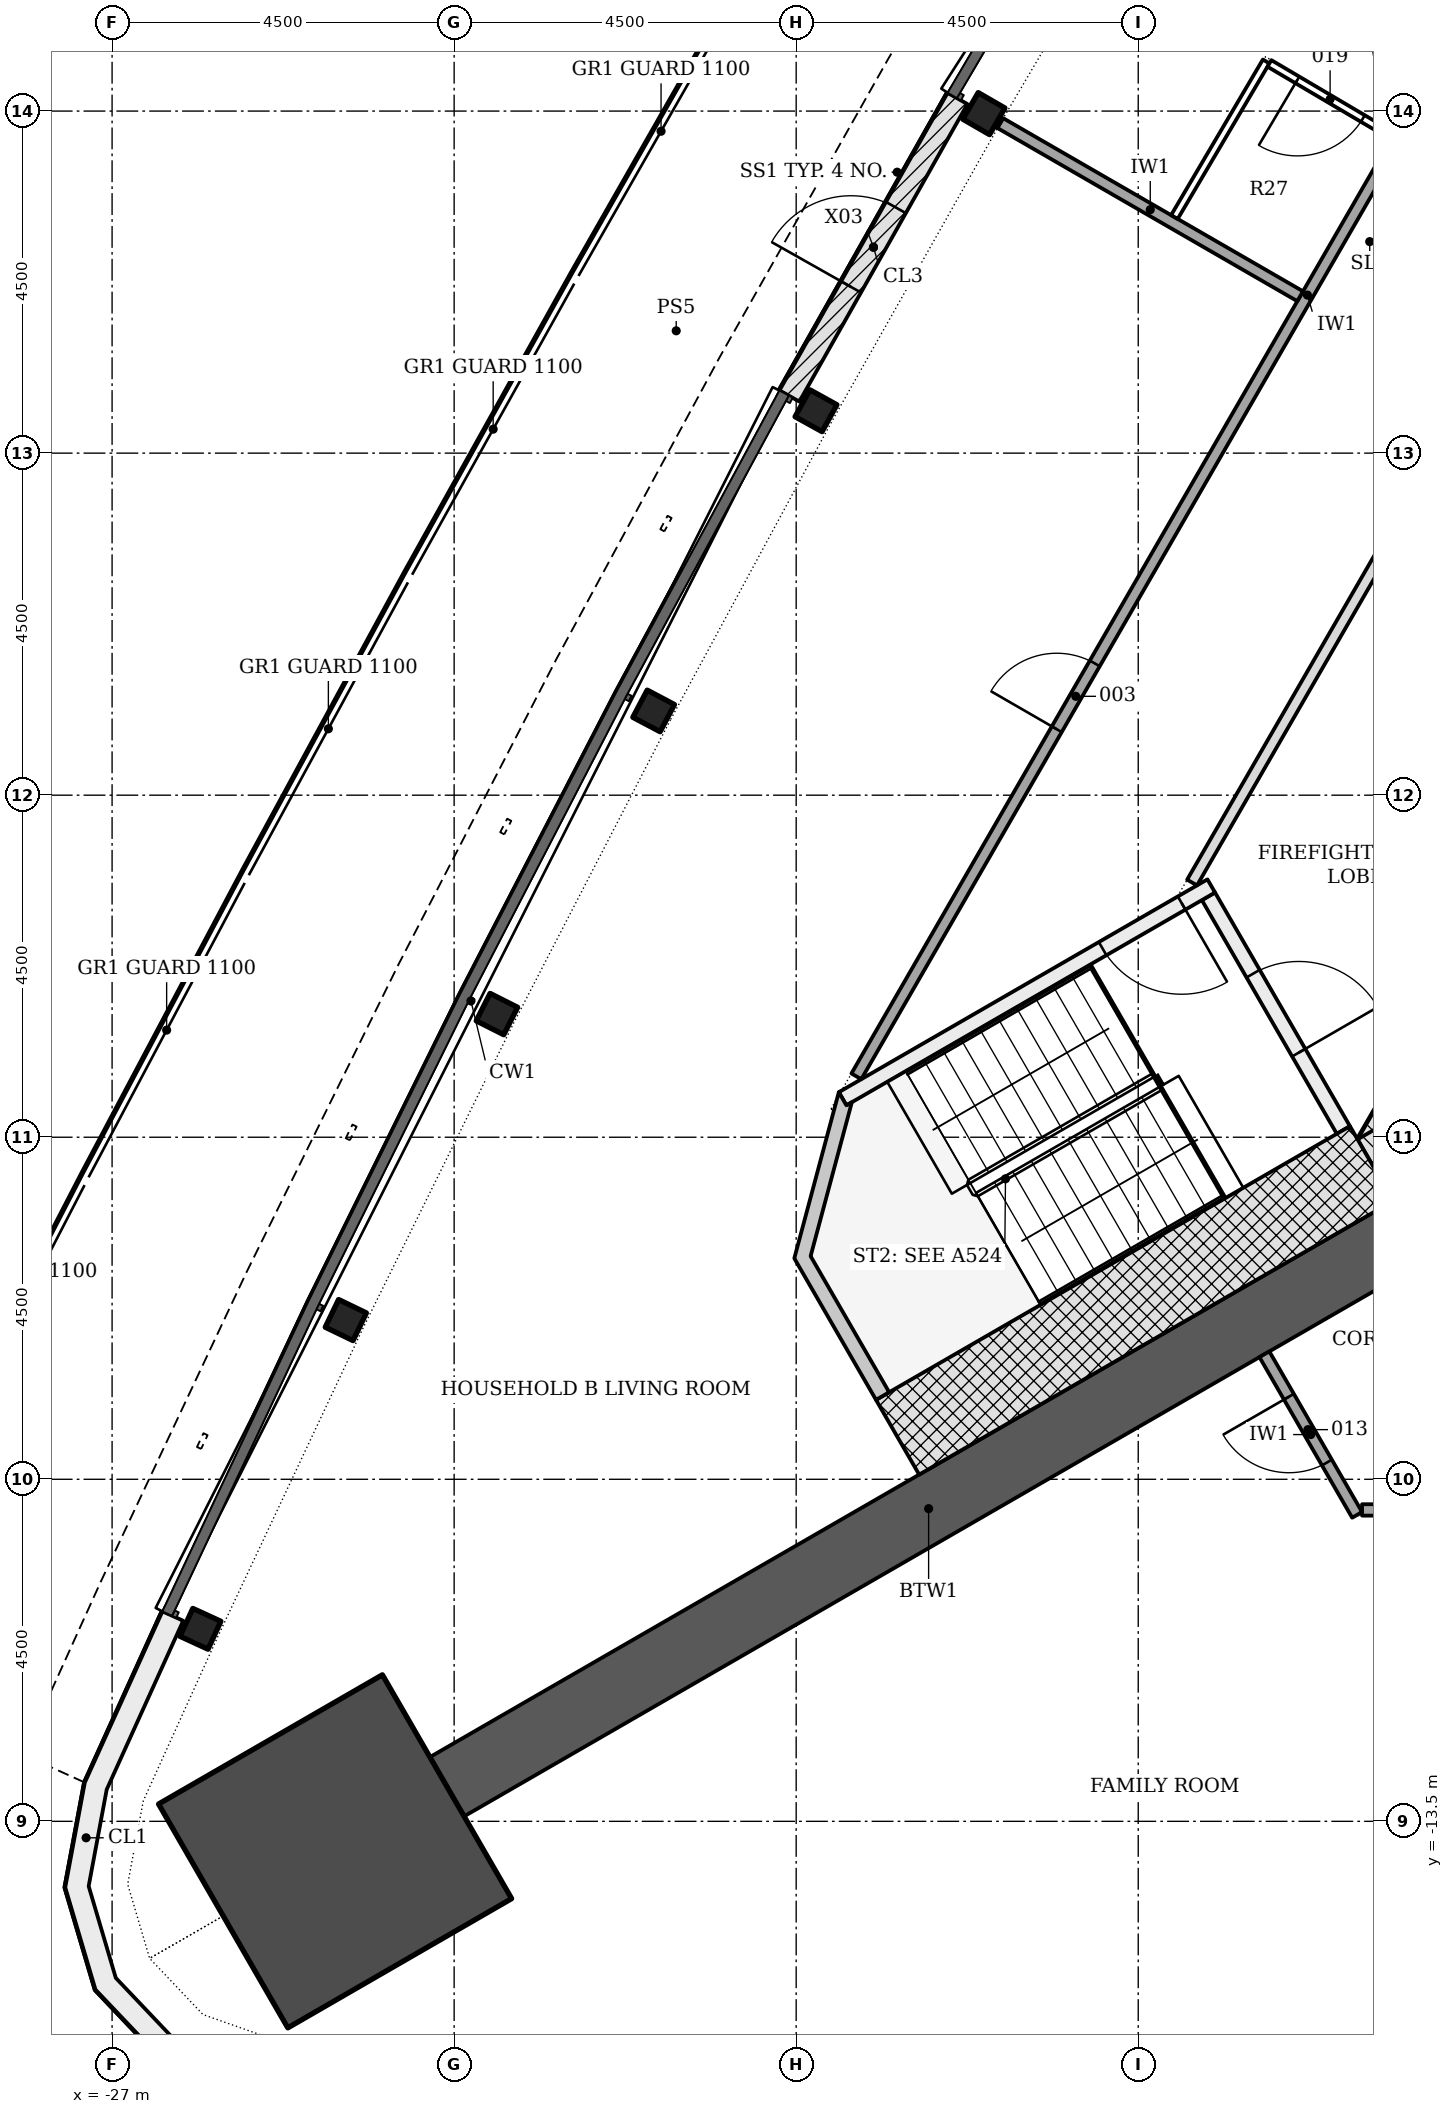
"""IFC4 building model, lengths in metres.
Left out: names, types, materials, properties, quantities, classifications, styles, units other than length and angle.
Written with IfcOpenShell. Run it as: python <this file> out.ifc"""

import sys

from ifc_helpers import new_model, si_unit, direction, frame, frame_2d, origin, origin_2d, place, context, subcontext, project, spatial, polyline, rectangle, i_section, outline, extrude, element, fill, save


model = new_model("IFC4")
c1 = context("Model", 3, precision=1e-05, world=origin(), true_north=direction((0.0, 1.0)))
c2 = subcontext(c1, "Body", "Model", "MODEL_VIEW")
j1 = project(units=[si_unit("LENGTHUNIT", "METRE"), si_unit("PLANEANGLEUNIT", "RADIAN")], contexts=[c1])
p1 = place(None, origin())
s1 = spatial("IfcSite", under=j1, at=p1, CompositionType="ELEMENT")
p2 = place(p1, origin())
s2 = spatial("IfcBuilding", under=s1, at=p2, CompositionType="ELEMENT")
p3 = place(p2, frame((0.0, 0.0, 24.0)))
s3 = spatial("IfcBuildingStorey", under=s2, at=p3, CompositionType="ELEMENT", Elevation=24.0)
p4 = place(p3, frame((-1.083, 11.281, -0.2), z_axis=(0.0, 0.0, 1.0), x_axis=(-0.500001446645, -0.866024568562, 0.0)))
e1 = element("IfcWall", 1, at=p4, inside=s3, PredefinedType="SHEAR", context=c2, shape_type="SweptSolid", body=[
    extrude(rectangle(XDim=18.458, YDim=0.7, at=frame_2d((9.229, 0.0))), origin(), (0.0, 0.0, 1.0), 3.6),
])
p5 = place(p4, frame((8.979, 0.0, 0.2)))
e2 = element("IfcOpeningElement", 2, at=p5, cuts=e1, PredefinedType="OPENING", context=c2, shape_type="SweptSolid", body=[
    extrude(rectangle(XDim=1.2, YDim=2.1, at=frame_2d((0.6, 1.05))), frame((0.0, 0.36, 0.0), z_axis=(0.0, -1.0, 0.0), x_axis=(1.0, 0.0, 0.0)), (0.0, 0.0, 1.0), 0.72),
])
p6 = place(p4, frame((11.029, 0.0, 0.2)))
e3 = element("IfcOpeningElement", 3, at=p6, cuts=e1, PredefinedType="OPENING", context=c2, shape_type="SweptSolid", body=[
    extrude(rectangle(XDim=1.2, YDim=2.1, at=frame_2d((0.6, 1.05))), frame((0.0, 0.36, 0.0), z_axis=(0.0, -1.0, 0.0), x_axis=(1.0, 0.0, 0.0)), (0.0, 0.0, 1.0), 0.72),
])
p7 = place(p3, frame((-10.311, -4.353, -0.2), z_axis=(0.0, 0.0, 1.0), x_axis=(0.500042739161, -0.866000726912, 0.0)))
e4 = element("IfcWall", 4, at=p7, inside=s3, PredefinedType="SHEAR", context=c2, shape_type="SweptSolid", body=[
    extrude(rectangle(XDim=2.771, YDim=0.7, at=frame_2d((1.386, 0.0))), origin(), (0.0, 0.0, 1.0), 3.6),
])
p8 = place(p3, frame((-9.922, -5.728, -0.2), z_axis=(0.0, 0.0, 1.0), x_axis=(-0.866028046028, -0.499995423472, 0.0)))
e5 = element("IfcWall", 5, at=p8, inside=s3, PredefinedType="SHEAR", context=c2, shape_type="SweptSolid", body=[
    extrude(rectangle(XDim=14.633, YDim=0.9, at=frame_2d((7.316, 0.0))), origin(), (0.0, 0.0, 1.0), 3.6),
])
p9 = place(p3, frame((-24.066, -13.895, -0.2), z_axis=(0.0, 0.0, 1.0), x_axis=(-0.866025403784, -0.5, 0.0)))
e6 = element("IfcColumn", 6, at=p9, inside=s3, PredefinedType="COLUMN", context=c2, shape_type="SweptSolid", body=[
    extrude(rectangle(XDim=3.4, YDim=3.4, at=origin_2d()), origin(), (0.0, 0.0, 1.0), 3.6),
])
for number, where, z_axis, x_axis in (
    (7, (-15.531, 8.967, -0.2), (0.0, 0.0, 1.0), (-0.5, -0.866, 0.0)),
    (8, (-17.739, 5.058, -0.2), (0.0, 0.0, 1.0), (-0.484, -0.875, 0.0)),
    (9, (-19.875, 1.108, -0.2), (0.0, 0.0, 1.0), (-0.468, -0.884, 0.0)),
    (10, (-21.937, -2.88, -0.2), (0.0, 0.0, 1.0), (-0.451, -0.893, 0.0)),
    (11, (-23.925, -6.905, -0.2), (0.0, 0.0, 1.0), (-0.434, -0.901, 0.0)),
    (12, (-25.838, -10.967, -0.2), (0.0, 0.0, 1.0), (-0.418, -0.909, 0.0)),
):
    element("IfcColumn", number, at=place(p3, frame(where, z_axis=z_axis, x_axis=x_axis)), inside=s3, PredefinedType="COLUMN", context=c2, shape_type="SweptSolid", body=[
        extrude(i_section(OverallWidth=0.404, OverallDepth=0.406, WebThickness=0.027, FlangeThickness=0.044, FilletRadius=0.015, at=origin_2d()), origin(), (0.0, 0.0, 1.0), 3.6),
    ])
p10 = place(p3, frame((-18.089, 5.252, 0.0), z_axis=(0.0, 0.0, 1.0), x_axis=(0.491969578613, 0.870612390056, 0.0)))
e13 = element("IfcWall", 13, at=p10, inside=s3, PredefinedType="NOTDEFINED", context=c2, shape_type="SweptSolid", body=[
    extrude(rectangle(XDim=4.496, YDim=0.3, at=frame_2d((2.248, 0.0))), origin(), (0.0, 0.0, 1.0), 3.3),
])
p11 = place(p10, frame((1.648, 0.0, 0.0)))
e14 = element("IfcOpeningElement", 14, at=p11, cuts=e13, PredefinedType="OPENING", context=c2, shape_type="SweptSolid", body=[
    extrude(rectangle(XDim=1.2, YDim=2.4, at=frame_2d((0.6, 1.2))), frame((0.0, 0.16, 0.0), z_axis=(0.0, -1.0, 0.0), x_axis=(1.0, 0.0, 0.0)), (0.0, 0.0, 1.0), 0.32),
])
p12 = place(p3, origin())
e15 = element("IfcWall", 15, at=p12, inside=s3, PredefinedType="NOTDEFINED", context=c2, shape_type="SweptSolid", body=[
    extrude(outline(polyline([(-26.338, -10.738), (-27.359, -12.99), (-27.616, -14.369), (-27.218, -15.715), (-26.252, -16.732), (-24.929, -17.199), (-22.468, -17.44), (-22.438, -17.142), (-24.863, -16.904), (-26.084, -16.473), (-26.951, -15.56), (-27.308, -14.353), (-27.071, -13.08), (-26.064, -10.861), (-26.338, -10.738)])), origin(), (0.0, 0.0, 1.0), 3.3),
])
p13 = place(p3, frame((-12.576, -1.331, -0.2), z_axis=(0.0, 0.0, 1.0), x_axis=(0.499970499736, -0.8660424351, 0.0)))
e16 = element("IfcWall", 16, at=p13, inside=s3, PredefinedType="SHEAR", context=c2, shape_type="SweptSolid", body=[
    extrude(rectangle(XDim=3.55, YDim=0.2, at=frame_2d((1.775, 0.0))), origin(), (0.0, 0.0, 1.0), 3.6),
])
p14 = place(p13, frame((1.175, 0.0, 0.2)))
e17 = element("IfcOpeningElement", 17, at=p14, cuts=e16, PredefinedType="OPENING", context=c2, shape_type="SweptSolid", body=[
    extrude(rectangle(XDim=1.2, YDim=2.1, at=frame_2d((0.6, 1.05))), frame((0.0, 0.11, 0.0), z_axis=(0.0, -1.0, 0.0), x_axis=(1.0, 0.0, 0.0)), (0.0, 0.0, 1.0), 0.22),
])
p15 = place(p3, frame((-12.539, -1.194, -0.2), z_axis=(0.0, 0.0, 1.0), x_axis=(-0.866045472092, -0.499965239061, 0.0)))
e18 = element("IfcWall", 18, at=p15, inside=s3, PredefinedType="SHEAR", context=c2, shape_type="SweptSolid", body=[
    extrude(rectangle(XDim=5.6, YDim=0.2, at=frame_2d((2.8, 0.0))), origin(), (0.0, 0.0, 1.0), 3.6),
])
p16 = place(p15, frame((0.45, 0.0, 0.2)))
e19 = element("IfcOpeningElement", 19, at=p16, cuts=e18, PredefinedType="OPENING", context=c2, shape_type="SweptSolid", body=[
    extrude(rectangle(XDim=1.2, YDim=2.1, at=frame_2d((0.6, 1.05))), frame((0.0, 0.11, 0.0), z_axis=(0.0, -1.0, 0.0), x_axis=(1.0, 0.0, 0.0)), (0.0, 0.0, 1.0), 0.22),
])
p17 = place(p3, frame((-10.43, -4.847, -0.2), z_axis=(0.0, 0.0, 1.0), x_axis=(-0.866018442252, -0.500012057535, 0.0)))
e20 = element("IfcWall", 20, at=p17, inside=s3, PredefinedType="SHEAR", context=c2, shape_type="SweptSolid", body=[
    extrude(rectangle(XDim=7.2, YDim=1.136, at=frame_2d((3.6, 0.0))), origin(), (0.0, 0.0, 1.0), 3.6),
])
p18 = place(p3, frame((0.0, 0.0, -0.2)))
e21 = element("IfcWall", 21, at=p18, inside=s3, PredefinedType="SHEAR", context=c2, shape_type="SweptSolid", body=[
    extrude(outline(polyline([(-17.439, -3.907), (-18.025, -6.093), (-16.95, -7.955), (-16.777, -7.855), (-17.81, -6.065), (-17.267, -4.039), (-17.339, -4.081), (-17.339, -4.081), (-17.339, -4.081), (-17.339, -4.081), (-17.339, -4.081), (-17.339, -4.081), (-17.339, -4.081), (-17.339, -4.081), (-17.339, -4.081), (-17.339, -4.081), (-17.339, -4.081), (-17.339, -4.081), (-17.339, -4.081), (-17.339, -4.081), (-17.339, -4.081), (-17.339, -4.081), (-17.339, -4.081), (-17.439, -3.907)])), origin(), (0.0, 0.0, 1.0), 3.6),
])
p19 = place(p3, frame((-17.208, -3.699, 0.0), z_axis=(0.0, 0.0, 1.0), x_axis=(0.499997567621, 0.866026808115, 0.0)))
e22 = element("IfcWall", 22, at=p19, inside=s3, PredefinedType="PARTITIONING", context=c2, shape_type="SweptSolid", body=[
    extrude(rectangle(XDim=23.736, YDim=0.15, at=frame_2d((11.868, 0.0))), origin(), (0.0, 0.0, 1.0), 2.768),
])
p20 = place(p19, frame((16.656, 0.0, 0.0)))
e23 = element("IfcOpeningElement", 23, at=p20, cuts=e22, PredefinedType="OPENING", context=c2, shape_type="SweptSolid", body=[
    extrude(rectangle(XDim=1.1, YDim=2.1, at=frame_2d((0.55, 1.05))), frame((0.0, 0.085, 0.0), z_axis=(0.0, -1.0, 0.0), x_axis=(1.0, 0.0, 0.0)), (0.0, 0.0, 1.0), 0.17),
])
p21 = place(p19, frame((14.662, 0.0, 0.0)))
e24 = element("IfcOpeningElement", 24, at=p21, cuts=e22, PredefinedType="OPENING", context=c2, shape_type="SweptSolid", body=[
    extrude(rectangle(XDim=1.1, YDim=2.1, at=frame_2d((0.55, 1.05))), frame((0.0, 0.085, 0.0), z_axis=(0.0, -1.0, 0.0), x_axis=(1.0, 0.0, 0.0)), (0.0, 0.0, 1.0), 0.17),
])
p22 = place(p19, frame((5.273, 0.0, 0.0)))
e25 = element("IfcOpeningElement", 25, at=p22, cuts=e22, PredefinedType="OPENING", context=c2, shape_type="SweptSolid", body=[
    extrude(rectangle(XDim=1.0, YDim=2.1, at=frame_2d((0.5, 1.05))), frame((0.0, 0.085, 0.0), z_axis=(0.0, -1.0, 0.0), x_axis=(1.0, 0.0, 0.0)), (0.0, 0.0, 1.0), 0.17),
])
p23 = place(p3, frame((-4.407, 13.374, 0.0), z_axis=(0.0, 0.0, 1.0), x_axis=(-0.499997181693, -0.866027030928, 0.0)))
e26 = element("IfcWall", 26, at=p23, inside=s3, PredefinedType="PARTITIONING", context=c2, shape_type="SweptSolid", body=[
    extrude(rectangle(XDim=16.77, YDim=0.15, at=frame_2d((8.385, 0.0))), origin(), (0.0, 0.0, 1.0), 2.768),
])
p24 = place(p23, frame((8.879, 0.0, 0.0)))
e27 = element("IfcOpeningElement", 27, at=p24, cuts=e26, PredefinedType="OPENING", context=c2, shape_type="SweptSolid", body=[
    extrude(rectangle(XDim=1.0, YDim=2.1, at=frame_2d((0.5, 1.05))), frame((0.0, 0.085, 0.0), z_axis=(0.0, -1.0, 0.0), x_axis=(1.0, 0.0, 0.0)), (0.0, 0.0, 1.0), 0.17),
])
p25 = place(p3, frame((-10.62, -9.468, 0.0), z_axis=(0.0, 0.0, 1.0), x_axis=(-0.500045838785, 0.865998937132, 0.0)))
e28 = element("IfcWall", 28, at=p25, inside=s3, PredefinedType="PARTITIONING", context=c2, shape_type="SweptSolid", body=[
    extrude(rectangle(XDim=2.44, YDim=0.15, at=frame_2d((1.22, 0.0))), origin(), (0.0, 0.0, 1.0), 3.4),
])
p26 = place(p25, frame((0.795, 0.0, 0.0)))
e29 = element("IfcOpeningElement", 29, at=p26, cuts=e28, PredefinedType="OPENING", context=c2, shape_type="SweptSolid", body=[
    extrude(rectangle(XDim=1.0, YDim=2.1, at=frame_2d((0.5, 1.05))), frame((0.0, 0.085, 0.0), z_axis=(0.0, -1.0, 0.0), x_axis=(1.0, 0.0, 0.0)), (0.0, 0.0, 1.0), 0.17),
])
p27 = place(p3, frame((-10.555, -9.403, 0.0), z_axis=(0.0, 0.0, 1.0), x_axis=(1.0, 0.0, 0.0)))
e30 = element("IfcWall", 30, at=p27, inside=s3, PredefinedType="PARTITIONING", context=c2, shape_type="SweptSolid", body=[
    extrude(rectangle(XDim=1.326, YDim=0.15, at=frame_2d((0.663, 0.0))), origin(), (0.0, 0.0, 1.0), 3.4),
])
p28 = place(p3, frame((-15.314, 8.842, 0.0), z_axis=(0.0, 0.0, 1.0), x_axis=(0.866031166731, -0.499990018151, 0.0)))
e31 = element("IfcWall", 31, at=p28, inside=s3, PredefinedType="PARTITIONING", context=c2, shape_type="SweptSolid", body=[
    extrude(rectangle(XDim=4.555, YDim=0.15, at=frame_2d((2.277, 0.0))), origin(), (0.0, 0.0, 1.0), 2.768),
])
p29 = place(p3, frame((-13.024, 7.606, 0.0), z_axis=(0.0, 0.0, 1.0), x_axis=(0.508012392693, 0.861349759895, 0.0)))
e32 = element("IfcWall", 32, at=p29, inside=s3, PredefinedType="PARTITIONING", context=c2, shape_type="SweptSolid", body=[
    extrude(rectangle(XDim=2.375, YDim=0.1, at=frame_2d((1.188, 0.0))), origin(), (0.0, 0.0, 1.0), 2.768),
])
p30 = place(p3, frame((-10.153, 8.671, 0.0), z_axis=(0.0, 0.0, 1.0), x_axis=(-0.861326599867, 0.508051659147, 0.0)))
e33 = element("IfcWall", 33, at=p30, inside=s3, PredefinedType="PARTITIONING", context=c2, shape_type="SweptSolid", body=[
    extrude(rectangle(XDim=1.882, YDim=0.1, at=frame_2d((0.941, 0.0))), origin(), (0.0, 0.0, 1.0), 3.4),
])
p31 = place(p30, frame((0.455, 0.0, 0.0)))
e34 = element("IfcOpeningElement", 34, at=p31, cuts=e33, PredefinedType="OPENING", context=c2, shape_type="SweptSolid", body=[
    extrude(rectangle(XDim=1.0, YDim=2.1, at=frame_2d((0.5, 1.05))), frame((0.0, 0.06, 0.0), z_axis=(0.0, -1.0, 0.0), x_axis=(1.0, 0.0, 0.0)), (0.0, 0.0, 1.0), 0.12),
])
p32 = place(p11, origin())
e35 = element("IfcDoor", 35, at=p32, inside=s3, OperationType="SINGLE_SWING_LEFT", PredefinedType="DOOR", context=c2, shape_type="SweptSolid", body=[
    extrude(rectangle(XDim=1.2, YDim=2.4, at=frame_2d((0.6, 1.2))), frame((0.0, 0.025, 0.0), z_axis=(0.0, -1.0, 0.0), x_axis=(1.0, 0.0, 0.0)), (0.0, 0.0, 1.0), 0.05),
])
fill(e14, e35)
p33 = place(p14, origin())
e36 = element("IfcDoor", 36, at=p33, inside=s3, OperationType="SINGLE_SWING_RIGHT", PredefinedType="DOOR", context=c2, shape_type="SweptSolid", body=[
    extrude(rectangle(XDim=1.2, YDim=2.1, at=frame_2d((0.6, 1.05))), frame((0.0, 0.025, 0.0), z_axis=(0.0, -1.0, 0.0), x_axis=(1.0, 0.0, 0.0)), (0.0, 0.0, 1.0), 0.05),
])
fill(e17, e36)
p34 = place(p16, origin())
e37 = element("IfcDoor", 37, at=p34, inside=s3, OperationType="SINGLE_SWING_LEFT", PredefinedType="DOOR", context=c2, shape_type="SweptSolid", body=[
    extrude(rectangle(XDim=1.2, YDim=2.1, at=frame_2d((0.6, 1.05))), frame((0.0, 0.025, 0.0), z_axis=(0.0, -1.0, 0.0), x_axis=(1.0, 0.0, 0.0)), (0.0, 0.0, 1.0), 0.05),
])
fill(e19, e37)
p35 = place(p22, origin())
e38 = element("IfcDoor", 38, at=p35, inside=s3, OperationType="SINGLE_SWING_LEFT", PredefinedType="DOOR", context=c2, shape_type="SweptSolid", body=[
    extrude(rectangle(XDim=1.0, YDim=2.1, at=frame_2d((0.5, 1.05))), frame((0.0, 0.025, 0.0), z_axis=(0.0, -1.0, 0.0), x_axis=(1.0, 0.0, 0.0)), (0.0, 0.0, 1.0), 0.05),
])
fill(e25, e38)
p36 = place(p26, origin())
e39 = element("IfcDoor", 39, at=p36, inside=s3, OperationType="SINGLE_SWING_RIGHT", PredefinedType="DOOR", context=c2, shape_type="SweptSolid", body=[
    extrude(rectangle(XDim=1.0, YDim=2.1, at=frame_2d((0.5, 1.05))), frame((0.0, 0.025, 0.0), z_axis=(0.0, -1.0, 0.0), x_axis=(1.0, 0.0, 0.0)), (0.0, 0.0, 1.0), 0.05),
])
fill(e29, e39)
p37 = place(p31, origin())
e40 = element("IfcDoor", 40, at=p37, inside=s3, OperationType="SINGLE_SWING_RIGHT", PredefinedType="DOOR", context=c2, shape_type="SweptSolid", body=[
    extrude(rectangle(XDim=1.0, YDim=2.1, at=frame_2d((0.5, 1.05))), frame((0.0, 0.025, 0.0), z_axis=(0.0, -1.0, 0.0), x_axis=(1.0, 0.0, 0.0)), (0.0, 0.0, 1.0), 0.05),
])
fill(e34, e40)
save(model, sys.argv[1])
